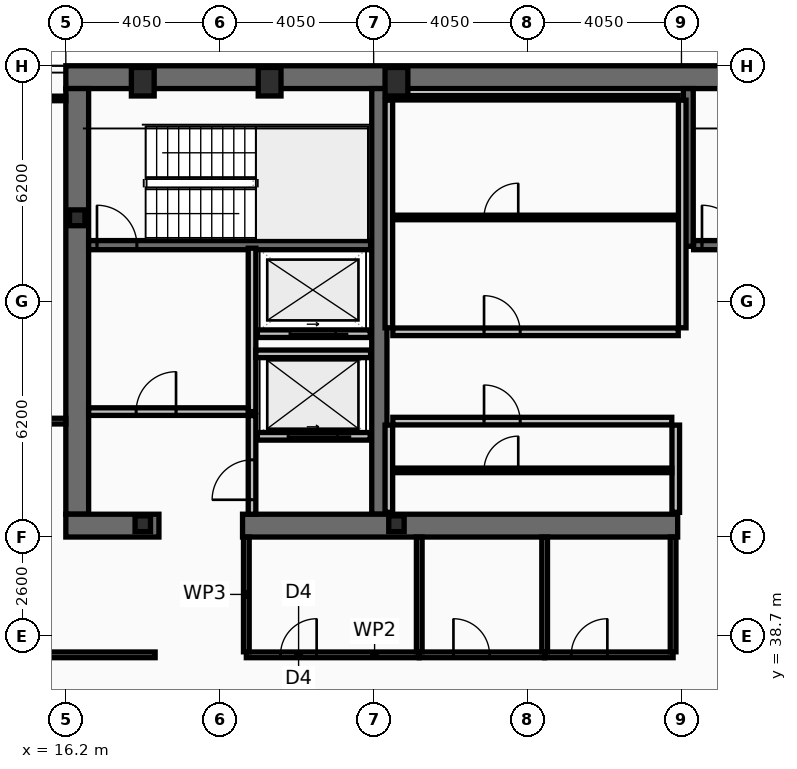
"""IFC4 building model, lengths in metres.
Left out: names, types, materials, properties, quantities, classifications, styles, units other than length and angle.
Written with IfcOpenShell. Run it as: python <this file> out.ifc"""

import sys

from ifc_helpers import new_model, si_unit, direction, frame, frame_2d, origin, origin_2d, place, context, subcontext, project, spatial, rectangle, hollow_rectangle, i_section, extrude, element, fill, save


model = new_model("IFC4")
c1 = context("Model", 3, precision=1e-05, world=origin(), true_north=direction((0.0, 1.0)))
c2 = subcontext(c1, "Body", "Model", "MODEL_VIEW")
j1 = project(units=[si_unit("LENGTHUNIT", "METRE"), si_unit("PLANEANGLEUNIT", "RADIAN")], contexts=[c1])
p1 = place(None, origin())
s1 = spatial("IfcSite", under=j1, at=p1, CompositionType="ELEMENT")
p2 = place(p1, origin())
s2 = spatial("IfcBuilding", under=s1, at=p2, CompositionType="ELEMENT")
p3 = place(p2, frame((0.0, 0.0, 239.0)))
s3 = spatial("IfcBuildingStorey", under=s2, at=p3, CompositionType="ELEMENT", Elevation=239.0)
p4 = place(p3, frame((16.2, 53.4, 0.0), z_axis=(0.0, 0.0, 1.0), x_axis=(1.0, 0.0, 0.0)))
e1 = element("IfcWall", 1, at=p4, inside=s3, PredefinedType="SHEAR", context=c2, shape_type="SweptSolid", body=[
    extrude(rectangle(XDim=40.5, YDim=0.6, at=frame_2d((20.25, 0.0))), origin(), (0.0, 0.0, 1.0), 3.44),
])
p5 = place(p3, frame((16.5, 41.9, 0.0), z_axis=(0.0, 0.0, 1.0), x_axis=(0.0, 1.0, 0.0)))
e2 = element("IfcWall", 2, at=p5, inside=s3, PredefinedType="SHEAR", context=c2, shape_type="SweptSolid", body=[
    extrude(rectangle(XDim=11.2, YDim=0.6, at=frame_2d((5.6, 0.0))), origin(), (0.0, 0.0, 1.0), 3.44),
])
p6 = place(p3, frame((24.45, 41.9, 0.0), z_axis=(0.0, 0.0, 1.0), x_axis=(0.0, 1.0, 0.0)))
e3 = element("IfcWall", 3, at=p6, inside=s3, PredefinedType="SHEAR", context=c2, shape_type="SweptSolid", body=[
    extrude(rectangle(XDim=11.2, YDim=0.4, at=frame_2d((5.6, 0.0))), origin(), (0.0, 0.0, 1.0), 3.44),
])
p7 = place(p3, frame((18.65, 41.6, 0.0), z_axis=(0.0, 0.0, 1.0), x_axis=(-1.0, 0.0, 0.0)))
e4 = element("IfcWall", 4, at=p7, inside=s3, PredefinedType="SHEAR", context=c2, shape_type="SweptSolid", body=[
    extrude(rectangle(XDim=2.45, YDim=0.6, at=frame_2d((1.225, 0.0))), origin(), (0.0, 0.0, 1.0), 3.44),
])
p8 = place(p3, frame((32.3, 41.6, 0.0), z_axis=(0.0, 0.0, 1.0), x_axis=(-1.0, 0.0, 0.0)))
e5 = element("IfcWall", 5, at=p8, inside=s3, PredefinedType="SHEAR", context=c2, shape_type="SweptSolid", body=[
    extrude(rectangle(XDim=11.45, YDim=0.6, at=frame_2d((5.725, 0.0))), origin(), (0.0, 0.0, 1.0), 3.44),
])
p9 = place(p3, frame((32.58, 48.95, 0.0), z_axis=(0.0, 0.0, 1.0), x_axis=(0.0, 1.0, 0.0)))
e6 = element("IfcWall", 6, at=p9, inside=s3, PredefinedType="SHEAR", context=c2, shape_type="SweptSolid", body=[
    extrude(rectangle(XDim=4.15, YDim=0.26, at=frame_2d((2.075, 0.0))), origin(), (0.0, 0.0, 1.0), 3.44),
])
p10 = place(p3, frame((16.8, 48.98, 0.0), z_axis=(0.0, 0.0, 1.0), x_axis=(1.0, 0.0, 0.0)))
e7 = element("IfcWall", 7, at=p10, inside=s3, PredefinedType="SHEAR", context=c2, shape_type="SweptSolid", body=[
    extrude(rectangle(XDim=7.42, YDim=0.24, at=frame_2d((3.71, 0.0))), origin(), (0.0, 0.0, 1.0), 3.44),
])
p11 = place(p10, frame((0.22, 0.0, 0.0)))
e8 = element("IfcOpeningElement", 8, at=p11, cuts=e7, PredefinedType="OPENING", context=c2, shape_type="SweptSolid", body=[
    extrude(rectangle(XDim=1.05, YDim=2.15, at=frame_2d((0.525, 1.075))), frame((0.0, 0.13, 0.0), z_axis=(0.0, -1.0, 0.0), x_axis=(1.0, 0.0, 0.0)), (0.0, 0.0, 1.0), 0.26),
])
p12 = place(p3, frame((32.72, 48.98, 0.0), z_axis=(0.0, 0.0, 1.0), x_axis=(1.0, 0.0, 0.0)))
e9 = element("IfcWall", 9, at=p12, inside=s3, PredefinedType="SHEAR", context=c2, shape_type="SweptSolid", body=[
    extrude(rectangle(XDim=7.56, YDim=0.24, at=frame_2d((3.78, 0.0))), origin(), (0.0, 0.0, 1.0), 3.44),
])
p13 = place(p12, frame((0.22, 0.0, 0.0)))
e10 = element("IfcOpeningElement", 10, at=p13, cuts=e9, PredefinedType="OPENING", context=c2, shape_type="SweptSolid", body=[
    extrude(rectangle(XDim=1.05, YDim=2.15, at=frame_2d((0.525, 1.075))), frame((0.0, 0.13, 0.0), z_axis=(0.0, -1.0, 0.0), x_axis=(1.0, 0.0, 0.0)), (0.0, 0.0, 1.0), 0.26),
])
for number, where, z_axis, x_axis in (
    (11, (18.225, 53.28, 0.0), (0.0, 0.0, 1.0), (1.0, 0.0, 0.0)),
    (12, (21.562, 53.28, 0.0), (0.0, 0.0, 1.0), (1.0, 0.0, 0.0)),
    (13, (24.9, 53.28, 0.0), (0.0, 0.0, 1.0), (1.0, 0.0, 0.0)),
):
    element("IfcColumn", number, at=place(p3, frame(where, z_axis=z_axis, x_axis=x_axis)), inside=s3, PredefinedType="COLUMN", context=c2, shape_type="SweptSolid", body=[
        extrude(hollow_rectangle(XDim=0.6, YDim=0.75, WallThickness=0.045, at=origin_2d()), origin(), (0.0, 0.0, 1.0), 3.6),
    ])
for number, where, z_axis, x_axis in (
    (14, (16.5, 49.7, 0.0), (0.0, 0.0, 1.0), (1.0, 0.0, 0.0)),
    (15, (18.225, 41.65, 0.0), (0.0, 0.0, 1.0), (1.0, 0.0, 0.0)),
    (16, (24.9, 41.65, 0.0), (0.0, 0.0, 1.0), (1.0, 0.0, 0.0)),
):
    element("IfcColumn", number, at=place(p3, frame(where, z_axis=z_axis, x_axis=x_axis)), inside=s3, PredefinedType="COLUMN", context=c2, shape_type="SweptSolid", body=[
        extrude(i_section(OverallWidth=0.406, OverallDepth=0.416, WebThickness=0.03, FlangeThickness=0.048, at=origin_2d()), origin(), (0.0, 0.0, 1.0), 3.6),
    ])
p14 = place(p3, frame((24.21, 43.95, 0.0), z_axis=(0.0, 0.0, 1.0), x_axis=(-1.0, 0.0, 0.0)))
e17 = element("IfcWall", 17, at=p14, inside=s3, PredefinedType="PARTITIONING", context=c2, shape_type="SweptSolid", body=[
    extrude(rectangle(XDim=2.97, YDim=0.2, at=frame_2d((1.485, 0.0))), origin(), (0.0, 0.0, 1.0), 3.44),
])
p15 = place(p14, frame((0.86, 0.0, 0.0)))
e18 = element("IfcOpeningElement", 18, at=p15, cuts=e17, PredefinedType="OPENING", context=c2, shape_type="SweptSolid", body=[
    extrude(rectangle(XDim=1.3, YDim=2.18, at=frame_2d((0.65, 1.09))), frame((0.0, 0.11, 0.0), z_axis=(0.0, -1.0, 0.0), x_axis=(1.0, 0.0, 0.0)), (0.0, 0.0, 1.0), 0.22),
])
p16 = place(p3, frame((24.21, 46.65, 0.0), z_axis=(0.0, 0.0, 1.0), x_axis=(-1.0, 0.0, 0.0)))
e19 = element("IfcWall", 19, at=p16, inside=s3, PredefinedType="PARTITIONING", context=c2, shape_type="SweptSolid", body=[
    extrude(rectangle(XDim=2.97, YDim=0.2, at=frame_2d((1.485, 0.0))), origin(), (0.0, 0.0, 1.0), 3.44),
])
p17 = place(p16, frame((0.91, 0.0, 0.0)))
e20 = element("IfcOpeningElement", 20, at=p17, cuts=e19, PredefinedType="OPENING", context=c2, shape_type="SweptSolid", body=[
    extrude(rectangle(XDim=1.2, YDim=2.18, at=frame_2d((0.6, 1.09))), frame((0.0, 0.11, 0.0), z_axis=(0.0, -1.0, 0.0), x_axis=(1.0, 0.0, 0.0)), (0.0, 0.0, 1.0), 0.22),
])
p18 = place(p3, frame((21.1, 44.6, 0.0), z_axis=(0.0, 0.0, 1.0), x_axis=(0.0, 1.0, 0.0)))
e21 = element("IfcWall", 21, at=p18, inside=s3, PredefinedType="PARTITIONING", context=c2, shape_type="SweptSolid", body=[
    extrude(rectangle(XDim=4.3, YDim=0.2, at=frame_2d((2.15, 0.0))), origin(), (0.0, 0.0, 1.0), 3.44),
])
p19 = place(p3, frame((16.8, 44.6, 0.0), z_axis=(0.0, 0.0, 1.0), x_axis=(1.0, 0.0, 0.0)))
e22 = element("IfcWall", 22, at=p19, inside=s3, PredefinedType="PARTITIONING", context=c2, shape_type="SweptSolid", body=[
    extrude(rectangle(XDim=4.2, YDim=0.2, at=frame_2d((2.1, 0.0))), origin(), (0.0, 0.0, 1.0), 3.44),
])
p20 = place(p19, frame((1.25, 0.0, 0.0)))
e23 = element("IfcOpeningElement", 23, at=p20, cuts=e22, PredefinedType="OPENING", context=c2, shape_type="SweptSolid", body=[
    extrude(rectangle(XDim=1.05, YDim=2.15, at=frame_2d((0.525, 1.075))), frame((0.0, 0.11, 0.0), z_axis=(0.0, -1.0, 0.0), x_axis=(1.0, 0.0, 0.0)), (0.0, 0.0, 1.0), 0.22),
])
p21 = place(p3, frame((21.2, 46.12, 0.0), z_axis=(0.0, 0.0, 1.0), x_axis=(1.0, 0.0, 0.0)))
e24 = element("IfcWall", 24, at=p21, inside=s3, PredefinedType="PARTITIONING", context=c2, shape_type="SweptSolid", body=[
    extrude(rectangle(XDim=3.02, YDim=0.2, at=frame_2d((1.51, 0.0))), origin(), (0.0, 0.0, 1.0), 3.44),
])
p22 = place(p3, frame((21.1, 41.9, 0.0), z_axis=(0.0, 0.0, 1.0), x_axis=(0.0, 1.0, 0.0)))
e25 = element("IfcWall", 25, at=p22, inside=s3, PredefinedType="PARTITIONING", context=c2, shape_type="SweptSolid", body=[
    extrude(rectangle(XDim=2.595, YDim=0.2, at=frame_2d((1.298, 0.0))), origin(), (0.0, 0.0, 1.0), 3.44),
])
p23 = place(p22, frame((0.38, 0.0, 0.0)))
e26 = element("IfcOpeningElement", 26, at=p23, cuts=e25, PredefinedType="OPENING", context=c2, shape_type="SweptSolid", body=[
    extrude(rectangle(XDim=1.05, YDim=2.15, at=frame_2d((0.525, 1.075))), frame((0.0, 0.11, 0.0), z_axis=(0.0, -1.0, 0.0), x_axis=(1.0, 0.0, 0.0)), (0.0, 0.0, 1.0), 0.22),
])
for number, where, z_axis, x_axis in (
    (27, (24.7, 46.805, 0.0), (0.0, 0.0, 1.0), (0.0, 1.0, 0.0)),
    (28, (32.42, 46.805, 0.0), (0.0, 0.0, 1.0), (0.0, 1.0, 0.0)),
):
    element("IfcWall", number, at=place(p3, frame(where, z_axis=z_axis, x_axis=x_axis)), inside=s3, PredefinedType="PARTITIONING", context=c2, shape_type="SweptSolid", body=[
        extrude(rectangle(XDim=5.99, YDim=0.2, at=frame_2d((2.995, 0.0))), origin(), (0.0, 0.0, 1.0), 3.44),
    ])
p24 = place(p3, frame((24.805, 52.86, 0.0), z_axis=(0.0, 0.0, 1.0), x_axis=(1.0, 0.0, 0.0)))
e29 = element("IfcWall", 29, at=p24, inside=s3, PredefinedType="PARTITIONING", context=c2, shape_type="SweptSolid", body=[
    extrude(rectangle(XDim=7.51, YDim=0.12, at=frame_2d((3.755, 0.0))), origin(), (0.0, 0.0, 1.0), 3.44),
])
p25 = place(p3, frame((24.805, 49.709, 0.0), z_axis=(0.0, 0.0, 1.0), x_axis=(1.0, 0.0, 0.0)))
e30 = element("IfcWall", 30, at=p25, inside=s3, PredefinedType="PARTITIONING", context=c2, shape_type="SweptSolid", body=[
    extrude(rectangle(XDim=7.51, YDim=0.12, at=frame_2d((3.755, 0.0))), origin(), (0.0, 0.0, 1.0), 3.44),
])
p26 = place(p25, frame((2.4, 0.0, 0.0)))
e31 = element("IfcOpeningElement", 31, at=p26, cuts=e30, PredefinedType="OPENING", context=c2, shape_type="SweptSolid", body=[
    extrude(rectangle(XDim=0.9, YDim=2.05, at=frame_2d((0.45, 1.025))), frame((0.0, 0.07, 0.0), z_axis=(0.0, -1.0, 0.0), x_axis=(1.0, 0.0, 0.0)), (0.0, 0.0, 1.0), 0.14),
])
p27 = place(p3, frame((24.805, 46.7, 0.0), z_axis=(0.0, 0.0, 1.0), x_axis=(1.0, 0.0, 0.0)))
e32 = element("IfcWall", 32, at=p27, inside=s3, PredefinedType="PARTITIONING", context=c2, shape_type="SweptSolid", body=[
    extrude(rectangle(XDim=7.51, YDim=0.2, at=frame_2d((3.755, 0.0))), origin(), (0.0, 0.0, 1.0), 3.44),
])
p28 = place(p27, frame((2.4, 0.0, 0.0)))
e33 = element("IfcOpeningElement", 33, at=p28, cuts=e32, PredefinedType="OPENING", context=c2, shape_type="SweptSolid", body=[
    extrude(rectangle(XDim=0.95, YDim=2.1, at=frame_2d((0.475, 1.05))), frame((0.0, 0.11, 0.0), z_axis=(0.0, -1.0, 0.0), x_axis=(1.0, 0.0, 0.0)), (0.0, 0.0, 1.0), 0.22),
])
for number, where, z_axis, x_axis in (
    (34, (24.7, 41.95, 0.0), (0.0, 0.0, 1.0), (0.0, 1.0, 0.0)),
    (35, (32.25, 41.95, 0.0), (0.0, 0.0, 1.0), (0.0, 1.0, 0.0)),
):
    element("IfcWall", number, at=place(p3, frame(where, z_axis=z_axis, x_axis=x_axis)), inside=s3, PredefinedType="PARTITIONING", context=c2, shape_type="SweptSolid", body=[
        extrude(rectangle(XDim=2.295, YDim=0.2, at=frame_2d((1.147, 0.0))), origin(), (0.0, 0.0, 1.0), 3.44),
    ])
p29 = place(p3, frame((24.805, 43.054, 0.0), z_axis=(0.0, 0.0, 1.0), x_axis=(1.0, 0.0, 0.0)))
e36 = element("IfcWall", 36, at=p29, inside=s3, PredefinedType="PARTITIONING", context=c2, shape_type="SweptSolid", body=[
    extrude(rectangle(XDim=7.34, YDim=0.12, at=frame_2d((3.67, 0.0))), origin(), (0.0, 0.0, 1.0), 3.44),
])
p30 = place(p29, frame((2.4, 0.0, 0.0)))
e37 = element("IfcOpeningElement", 37, at=p30, cuts=e36, PredefinedType="OPENING", context=c2, shape_type="SweptSolid", body=[
    extrude(rectangle(XDim=0.9, YDim=2.05, at=frame_2d((0.45, 1.025))), frame((0.0, 0.07, 0.0), z_axis=(0.0, -1.0, 0.0), x_axis=(1.0, 0.0, 0.0)), (0.0, 0.0, 1.0), 0.14),
])
p31 = place(p3, frame((24.805, 44.35, 0.0), z_axis=(0.0, 0.0, 1.0), x_axis=(1.0, 0.0, 0.0)))
e38 = element("IfcWall", 38, at=p31, inside=s3, PredefinedType="PARTITIONING", context=c2, shape_type="SweptSolid", body=[
    extrude(rectangle(XDim=7.34, YDim=0.2, at=frame_2d((3.67, 0.0))), origin(), (0.0, 0.0, 1.0), 3.44),
])
p32 = place(p31, frame((2.4, 0.0, 0.0)))
e39 = element("IfcOpeningElement", 39, at=p32, cuts=e38, PredefinedType="OPENING", context=c2, shape_type="SweptSolid", body=[
    extrude(rectangle(XDim=0.95, YDim=2.1, at=frame_2d((0.475, 1.05))), frame((0.0, 0.11, 0.0), z_axis=(0.0, -1.0, 0.0), x_axis=(1.0, 0.0, 0.0)), (0.0, 0.0, 1.0), 0.22),
])
p33 = place(p3, frame((20.95, 38.2, 0.0), z_axis=(0.0, 0.0, 1.0), x_axis=(1.0, 0.0, 0.0)))
e40 = element("IfcWall", 40, at=p33, inside=s3, PredefinedType="PARTITIONING", context=c2, shape_type="SweptSolid", body=[
    extrude(rectangle(XDim=4.55, YDim=0.15, at=frame_2d((2.275, 0.0))), origin(), (0.0, 0.0, 1.0), 2.78),
])
p34 = place(p33, frame((0.9, 0.0, 0.0)))
e41 = element("IfcOpeningElement", 41, at=p34, cuts=e40, PredefinedType="OPENING", context=c2, shape_type="SweptSolid", body=[
    extrude(rectangle(XDim=0.95, YDim=2.05, at=frame_2d((0.475, 1.025))), frame((0.0, 0.085, 0.0), z_axis=(0.0, -1.0, 0.0), x_axis=(1.0, 0.0, 0.0)), (0.0, 0.0, 1.0), 0.17),
])
p35 = place(p3, frame((25.5, 38.2, 0.0), z_axis=(0.0, 0.0, 1.0), x_axis=(1.0, 0.0, 0.0)))
e42 = element("IfcWall", 42, at=p35, inside=s3, PredefinedType="PARTITIONING", context=c2, shape_type="SweptSolid", body=[
    extrude(rectangle(XDim=3.3, YDim=0.15, at=frame_2d((1.65, 0.0))), origin(), (0.0, 0.0, 1.0), 3.44),
])
p36 = place(p35, frame((0.9, 0.0, 0.0)))
e43 = element("IfcOpeningElement", 43, at=p36, cuts=e42, PredefinedType="OPENING", context=c2, shape_type="SweptSolid", body=[
    extrude(rectangle(XDim=0.95, YDim=2.05, at=frame_2d((0.475, 1.025))), frame((0.0, 0.085, 0.0), z_axis=(0.0, -1.0, 0.0), x_axis=(1.0, 0.0, 0.0)), (0.0, 0.0, 1.0), 0.17),
])
p37 = place(p3, frame((28.8, 38.2, 0.0), z_axis=(0.0, 0.0, 1.0), x_axis=(1.0, 0.0, 0.0)))
e44 = element("IfcWall", 44, at=p37, inside=s3, PredefinedType="PARTITIONING", context=c2, shape_type="SweptSolid", body=[
    extrude(rectangle(XDim=3.38, YDim=0.15, at=frame_2d((1.69, 0.0))), origin(), (0.0, 0.0, 1.0), 2.78),
])
p38 = place(p37, frame((0.7, 0.0, 0.0)))
e45 = element("IfcOpeningElement", 45, at=p38, cuts=e44, PredefinedType="OPENING", context=c2, shape_type="SweptSolid", body=[
    extrude(rectangle(XDim=0.95, YDim=2.05, at=frame_2d((0.475, 1.025))), frame((0.0, 0.085, 0.0), z_axis=(0.0, -1.0, 0.0), x_axis=(1.0, 0.0, 0.0)), (0.0, 0.0, 1.0), 0.17),
])
for number, where, z_axis, x_axis in (
    (46, (20.95, 38.28, 0.0), (0.0, 0.0, 1.0), (0.0, 1.0, 0.0)),
    (47, (25.5, 38.28, 0.0), (0.0, 0.0, 1.0), (0.0, 1.0, 0.0)),
    (48, (28.8, 38.28, 0.0), (0.0, 0.0, 1.0), (0.0, 1.0, 0.0)),
    (49, (32.18, 38.28, 0.0), (0.0, 0.0, 1.0), (0.0, 1.0, 0.0)),
):
    element("IfcWall", number, at=place(p3, frame(where, z_axis=z_axis, x_axis=x_axis)), inside=s3, PredefinedType="PARTITIONING", context=c2, shape_type="SweptSolid", body=[
        extrude(rectangle(XDim=3.02, YDim=0.15, at=frame_2d((1.51, 0.0))), origin(), (0.0, 0.0, 1.0), 3.44),
    ])
p39 = place(p3, frame((10.03, 38.2, 0.0), z_axis=(0.0, 0.0, 1.0), x_axis=(1.0, 0.0, 0.0)))
e50 = element("IfcWall", 50, at=p39, inside=s3, PredefinedType="PARTITIONING", context=c2, shape_type="SweptSolid", body=[
    extrude(rectangle(XDim=8.52, YDim=0.15, at=frame_2d((4.26, 0.0))), origin(), (0.0, 0.0, 1.0), 2.78),
])
p40 = place(p39, frame((4.32, 0.0, 0.0)))
e51 = element("IfcOpeningElement", 51, at=p40, cuts=e50, PredefinedType="OPENING", context=c2, shape_type="SweptSolid", body=[
    extrude(rectangle(XDim=0.95, YDim=2.05, at=frame_2d((0.475, 1.025))), frame((0.0, 0.085, 0.0), z_axis=(0.0, -1.0, 0.0), x_axis=(1.0, 0.0, 0.0)), (0.0, 0.0, 1.0), 0.17),
])
p41 = place(p3, frame((10.095, 44.35, 0.0), z_axis=(0.0, 0.0, 1.0), x_axis=(1.0, 0.0, 0.0)))
e52 = element("IfcWall", 52, at=p41, inside=s3, PredefinedType="PARTITIONING", context=c2, shape_type="SweptSolid", body=[
    extrude(rectangle(XDim=6.105, YDim=0.15, at=frame_2d((3.052, 0.0))), origin(), (0.0, 0.0, 1.0), 2.83),
])
p42 = place(p41, frame((4.32, 0.0, 0.0)))
e53 = element("IfcOpeningElement", 53, at=p42, cuts=e52, PredefinedType="OPENING", context=c2, shape_type="SweptSolid", body=[
    extrude(rectangle(XDim=0.9, YDim=2.05, at=frame_2d((0.45, 1.025))), frame((0.0, 0.085, 0.0), z_axis=(0.0, -1.0, 0.0), x_axis=(1.0, 0.0, 0.0)), (0.0, 0.0, 1.0), 0.17),
])
p43 = place(p3, frame((10.095, 52.84, 0.0), z_axis=(0.0, 0.0, 1.0), x_axis=(1.0, 0.0, 0.0)))
e54 = element("IfcWall", 54, at=p43, inside=s3, PredefinedType="PARTITIONING", context=c2, shape_type="SweptSolid", body=[
    extrude(rectangle(XDim=6.105, YDim=0.12, at=frame_2d((3.052, 0.0))), origin(), (0.0, 0.0, 1.0), 3.44),
])
p44 = place(p11, origin())
e55 = element("IfcDoor", 55, at=p44, inside=s3, OperationType="SINGLE_SWING_LEFT", PredefinedType="DOOR", context=c2, shape_type="SweptSolid", body=[
    extrude(rectangle(XDim=1.05, YDim=2.15, at=frame_2d((0.525, 1.075))), frame((0.0, 0.025, 0.0), z_axis=(0.0, -1.0, 0.0), x_axis=(1.0, 0.0, 0.0)), (0.0, 0.0, 1.0), 0.05),
])
fill(e8, e55)
p45 = place(p13, origin())
e56 = element("IfcDoor", 56, at=p45, inside=s3, OperationType="SINGLE_SWING_LEFT", PredefinedType="DOOR", context=c2, shape_type="SweptSolid", body=[
    extrude(rectangle(XDim=1.05, YDim=2.15, at=frame_2d((0.525, 1.075))), frame((0.0, 0.025, 0.0), z_axis=(0.0, -1.0, 0.0), x_axis=(1.0, 0.0, 0.0)), (0.0, 0.0, 1.0), 0.05),
])
fill(e10, e56)
p46 = place(p15, origin())
e57 = element("IfcDoor", 57, at=p46, inside=s3, OperationType="SLIDING_TO_LEFT", PredefinedType="DOOR", context=c2, shape_type="SweptSolid", body=[
    extrude(rectangle(XDim=1.3, YDim=2.18, at=frame_2d((0.65, 1.09))), frame((0.0, 0.025, 0.0), z_axis=(0.0, -1.0, 0.0), x_axis=(1.0, 0.0, 0.0)), (0.0, 0.0, 1.0), 0.05),
])
fill(e18, e57)
p47 = place(p17, origin())
e58 = element("IfcDoor", 58, at=p47, inside=s3, OperationType="SLIDING_TO_LEFT", PredefinedType="DOOR", context=c2, shape_type="SweptSolid", body=[
    extrude(rectangle(XDim=1.2, YDim=2.18, at=frame_2d((0.6, 1.09))), frame((0.0, 0.025, 0.0), z_axis=(0.0, -1.0, 0.0), x_axis=(1.0, 0.0, 0.0)), (0.0, 0.0, 1.0), 0.05),
])
fill(e20, e58)
p48 = place(p20, origin())
e59 = element("IfcDoor", 59, at=p48, inside=s3, OperationType="SINGLE_SWING_RIGHT", PredefinedType="DOOR", context=c2, shape_type="SweptSolid", body=[
    extrude(rectangle(XDim=1.05, YDim=2.15, at=frame_2d((0.525, 1.075))), frame((0.0, 0.025, 0.0), z_axis=(0.0, -1.0, 0.0), x_axis=(1.0, 0.0, 0.0)), (0.0, 0.0, 1.0), 0.05),
])
fill(e23, e59)
p49 = place(p23, origin())
e60 = element("IfcDoor", 60, at=p49, inside=s3, OperationType="SINGLE_SWING_LEFT", PredefinedType="DOOR", context=c2, shape_type="SweptSolid", body=[
    extrude(rectangle(XDim=1.05, YDim=2.15, at=frame_2d((0.525, 1.075))), frame((0.0, 0.025, 0.0), z_axis=(0.0, -1.0, 0.0), x_axis=(1.0, 0.0, 0.0)), (0.0, 0.0, 1.0), 0.05),
])
fill(e26, e60)
p50 = place(p26, origin())
e61 = element("IfcDoor", 61, at=p50, inside=s3, OperationType="SINGLE_SWING_RIGHT", PredefinedType="DOOR", context=c2, shape_type="SweptSolid", body=[
    extrude(rectangle(XDim=0.9, YDim=2.05, at=frame_2d((0.45, 1.025))), frame((0.0, 0.025, 0.0), z_axis=(0.0, -1.0, 0.0), x_axis=(1.0, 0.0, 0.0)), (0.0, 0.0, 1.0), 0.05),
])
fill(e31, e61)
p51 = place(p28, origin())
e62 = element("IfcDoor", 62, at=p51, inside=s3, OperationType="SINGLE_SWING_LEFT", PredefinedType="DOOR", context=c2, shape_type="SweptSolid", body=[
    extrude(rectangle(XDim=0.95, YDim=2.1, at=frame_2d((0.475, 1.05))), frame((0.0, 0.025, 0.0), z_axis=(0.0, -1.0, 0.0), x_axis=(1.0, 0.0, 0.0)), (0.0, 0.0, 1.0), 0.05),
])
fill(e33, e62)
p52 = place(p30, origin())
e63 = element("IfcDoor", 63, at=p52, inside=s3, OperationType="SINGLE_SWING_RIGHT", PredefinedType="DOOR", context=c2, shape_type="SweptSolid", body=[
    extrude(rectangle(XDim=0.9, YDim=2.05, at=frame_2d((0.45, 1.025))), frame((0.0, 0.025, 0.0), z_axis=(0.0, -1.0, 0.0), x_axis=(1.0, 0.0, 0.0)), (0.0, 0.0, 1.0), 0.05),
])
fill(e37, e63)
p53 = place(p32, origin())
e64 = element("IfcDoor", 64, at=p53, inside=s3, OperationType="SINGLE_SWING_LEFT", PredefinedType="DOOR", context=c2, shape_type="SweptSolid", body=[
    extrude(rectangle(XDim=0.95, YDim=2.1, at=frame_2d((0.475, 1.05))), frame((0.0, 0.025, 0.0), z_axis=(0.0, -1.0, 0.0), x_axis=(1.0, 0.0, 0.0)), (0.0, 0.0, 1.0), 0.05),
])
fill(e39, e64)
p54 = place(p34, origin())
e65 = element("IfcDoor", 65, at=p54, inside=s3, OperationType="SINGLE_SWING_RIGHT", PredefinedType="DOOR", context=c2, shape_type="SweptSolid", body=[
    extrude(rectangle(XDim=0.95, YDim=2.05, at=frame_2d((0.475, 1.025))), frame((0.0, 0.025, 0.0), z_axis=(0.0, -1.0, 0.0), x_axis=(1.0, 0.0, 0.0)), (0.0, 0.0, 1.0), 0.05),
])
fill(e41, e65)
p55 = place(p36, origin())
e66 = element("IfcDoor", 66, at=p55, inside=s3, OperationType="SINGLE_SWING_LEFT", PredefinedType="DOOR", context=c2, shape_type="SweptSolid", body=[
    extrude(rectangle(XDim=0.95, YDim=2.05, at=frame_2d((0.475, 1.025))), frame((0.0, 0.025, 0.0), z_axis=(0.0, -1.0, 0.0), x_axis=(1.0, 0.0, 0.0)), (0.0, 0.0, 1.0), 0.05),
])
fill(e43, e66)
p56 = place(p38, origin())
e67 = element("IfcDoor", 67, at=p56, inside=s3, OperationType="SINGLE_SWING_RIGHT", PredefinedType="DOOR", context=c2, shape_type="SweptSolid", body=[
    extrude(rectangle(XDim=0.95, YDim=2.05, at=frame_2d((0.475, 1.025))), frame((0.0, 0.025, 0.0), z_axis=(0.0, -1.0, 0.0), x_axis=(1.0, 0.0, 0.0)), (0.0, 0.0, 1.0), 0.05),
])
fill(e45, e67)
save(model, sys.argv[1])
